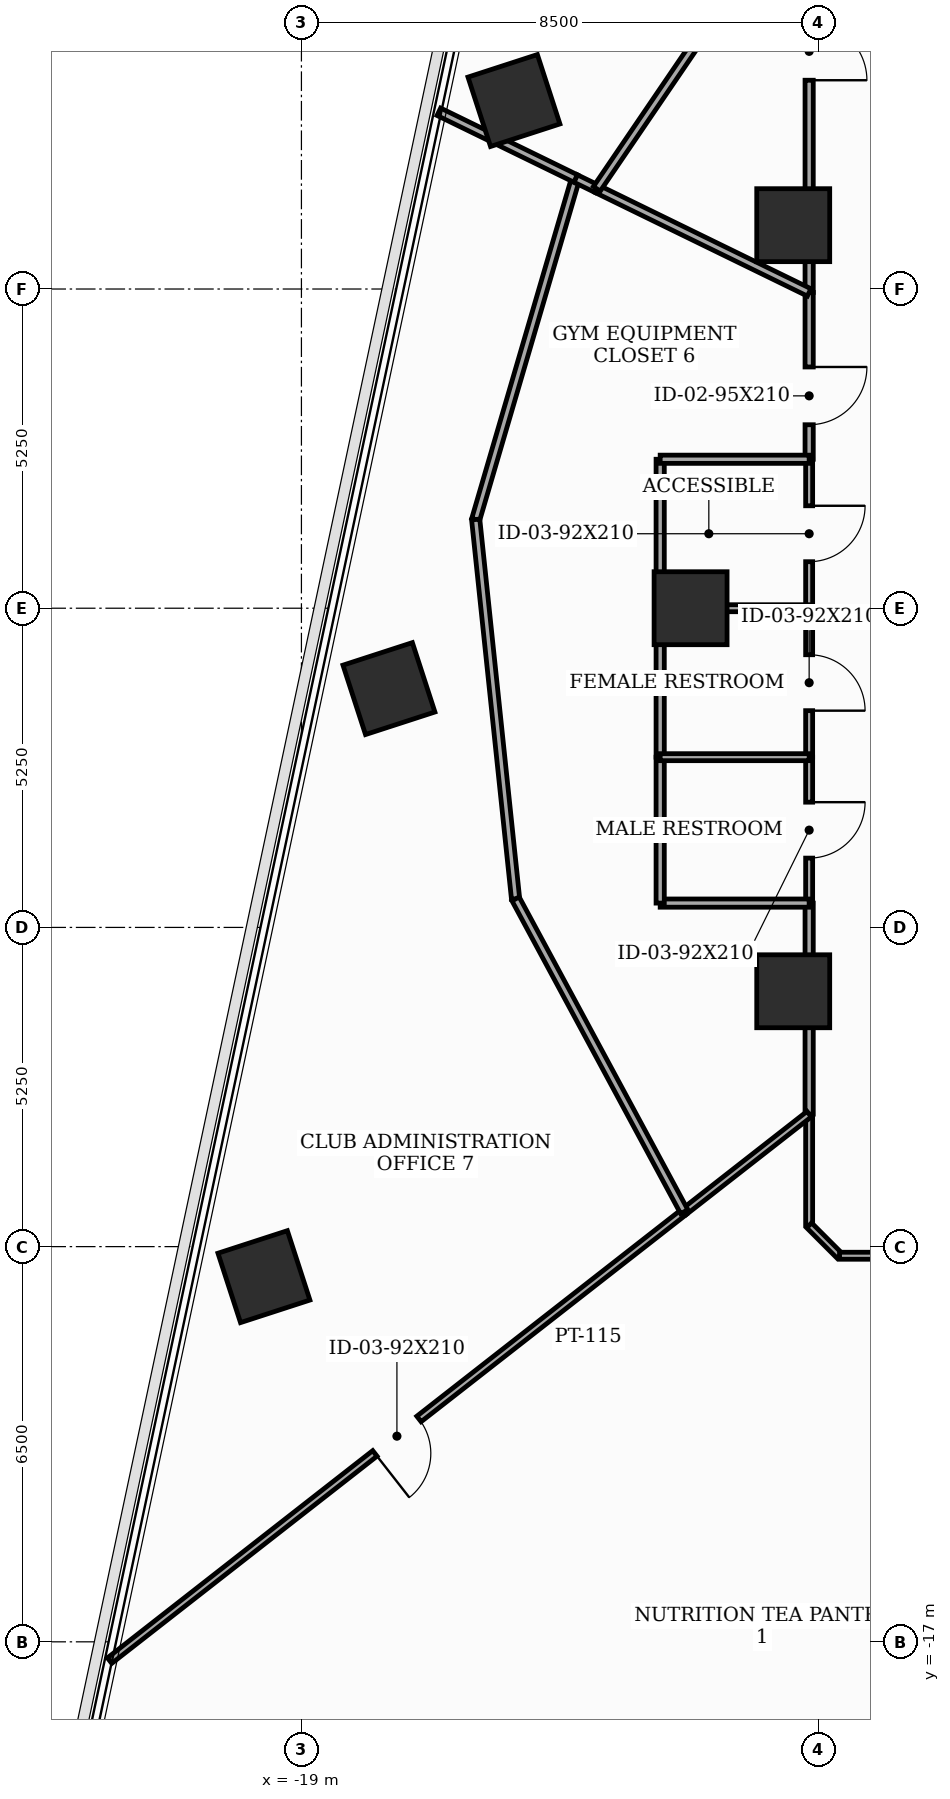
"""IFC4 building model, lengths in metres.
Left out: names, types, materials, properties, quantities, classifications, styles, units other than length and angle.
Written with IfcOpenShell. Run it as: python <this file> out.ifc"""

import sys

from ifc_helpers import new_model, si_unit, direction, frame, frame_2d, origin, origin_2d, place, context, subcontext, project, spatial, rectangle, extrude, element, fill, save


model = new_model("IFC4")
c1 = context("Model", 3, precision=1e-05, world=origin(), true_north=direction((0.0, 1.0)))
c2 = subcontext(c1, "Body", "Model", "MODEL_VIEW")
j1 = project(units=[si_unit("LENGTHUNIT", "METRE"), si_unit("PLANEANGLEUNIT", "RADIAN")], contexts=[c1])
p1 = place(None, origin())
s1 = spatial("IfcSite", under=j1, at=p1, CompositionType="ELEMENT")
p2 = place(p1, origin())
s2 = spatial("IfcBuilding", under=s1, at=p2, CompositionType="ELEMENT")
p3 = place(p2, frame((0.0, 0.0, 108.8)))
s3 = spatial("IfcBuildingStorey", under=s2, at=p3, CompositionType="ELEMENT", Elevation=108.8)
for number, where, z_axis, x_axis in (
    (1, (-10.912, 6.3, 0.0), (0.0, 0.0, 1.0), (1.0, 0.0, 0.0)),
    (2, (-12.6, 0.0, 0.0), (0.0, 0.0, 1.0), (1.0, 0.0, 0.0)),
    (3, (-10.912, -6.3, 0.0), (0.0, 0.0, 1.0), (1.0, 0.0, 0.0)),
    (4, (-15.505, 8.35, 0.0), (0.0, 0.0, 1.0), (0.951, 0.309, 0.0)),
    (5, (-17.561, -1.322, 0.0), (0.0, 0.0, 1.0), (0.951, 0.309, 0.0)),
    (6, (-19.616, -10.994, 0.0), (0.0, 0.0, 1.0), (0.951, 0.309, 0.0)),
):
    element("IfcColumn", number, at=place(p3, frame(where, z_axis=z_axis, x_axis=x_axis)), inside=s3, PredefinedType="COLUMN", context=c2, shape_type="SweptSolid", body=[
        extrude(rectangle(XDim=1.2, YDim=1.2, at=origin_2d()), origin(), (0.0, 0.0, 1.0), 3.7),
    ])
p4 = place(p3, frame((-10.65, -8.321, 0.0), z_axis=(0.0, 0.0, 1.0), x_axis=(0.0, -1.0, 0.0)))
e7 = element("IfcWall", 7, at=p4, inside=s3, PredefinedType="PARTITIONING", context=c2, shape_type="SweptSolid", body=[
    extrude(rectangle(XDim=1.829, YDim=0.115, at=frame_2d((0.915, 0.0))), origin(), (0.0, 0.0, 1.0), 3.5),
])
p5 = place(p3, frame((-10.65, -10.15, 0.0), z_axis=(0.0, 0.0, 1.0), x_axis=(0.707106781187, -0.707106781187, 0.0)))
e8 = element("IfcWall", 8, at=p5, inside=s3, PredefinedType="PARTITIONING", context=c2, shape_type="SweptSolid", body=[
    extrude(rectangle(XDim=0.707, YDim=0.115, at=frame_2d((0.354, 0.0))), origin(), (0.0, 0.0, 1.0), 3.5),
])
p6 = place(p3, frame((-10.15, -10.65, 0.0), z_axis=(0.0, 0.0, 1.0), x_axis=(1.0, 0.0, 0.0)))
e9 = element("IfcWall", 9, at=p6, inside=s3, PredefinedType="PARTITIONING", context=c2, shape_type="SweptSolid", body=[
    extrude(rectangle(XDim=6.158, YDim=0.115, at=frame_2d((3.079, 0.0))), origin(), (0.0, 0.0, 1.0), 2.785),
])
p7 = place(p3, frame((-10.65, -4.85, 0.0), z_axis=(0.0, 0.0, 1.0), x_axis=(0.0, -1.0, 0.0)))
e10 = element("IfcWall", 10, at=p7, inside=s3, PredefinedType="PARTITIONING", context=c2, shape_type="SweptSolid", body=[
    extrude(rectangle(XDim=3.471, YDim=0.135, at=frame_2d((1.735, 0.0))), origin(), (0.0, 0.0, 1.0), 2.785),
])
p8 = place(p3, frame((-10.65, 5.194, 0.0), z_axis=(0.0, 0.0, 1.0), x_axis=(0.0, -1.0, 0.0)))
e11 = element("IfcWall", 11, at=p8, inside=s3, PredefinedType="PARTITIONING", context=c2, shape_type="SweptSolid", body=[
    extrude(rectangle(XDim=2.744, YDim=0.135, at=frame_2d((1.372, 0.0))), origin(), (0.0, 0.0, 1.0), 3.5),
])
p9 = place(p8, frame((1.226, 0.0, 0.0)))
e12 = element("IfcOpeningElement", 12, at=p9, cuts=e11, PredefinedType="OPENING", context=c2, shape_type="SweptSolid", body=[
    extrude(rectangle(XDim=0.95, YDim=2.1, at=frame_2d((0.475, 1.05))), frame((0.0, 0.077, 0.0), z_axis=(0.0, -1.0, 0.0), x_axis=(1.0, 0.0, 0.0)), (0.0, 0.0, 1.0), 0.155),
])
p10 = place(p3, frame((-10.65, 0.0, 0.0), z_axis=(0.0, 0.0, 1.0), x_axis=(0.0, -1.0, 0.0)))
e13 = element("IfcWall", 13, at=p10, inside=s3, PredefinedType="PARTITIONING", context=c2, shape_type="SweptSolid", body=[
    extrude(rectangle(XDim=2.45, YDim=0.115, at=frame_2d((1.225, 0.0))), origin(), (0.0, 0.0, 1.0), 2.785),
])
p11 = place(p10, frame((0.765, 0.0, 0.0)))
e14 = element("IfcOpeningElement", 14, at=p11, cuts=e13, PredefinedType="OPENING", context=c2, shape_type="SweptSolid", body=[
    extrude(rectangle(XDim=0.92, YDim=2.1, at=frame_2d((0.46, 1.05))), frame((0.0, 0.067, 0.0), z_axis=(0.0, -1.0, 0.0), x_axis=(1.0, 0.0, 0.0)), (0.0, 0.0, 1.0), 0.135),
])
p12 = place(p3, frame((-10.65, -2.45, 0.0), z_axis=(0.0, 0.0, 1.0), x_axis=(0.0, -1.0, 0.0)))
e15 = element("IfcWall", 15, at=p12, inside=s3, PredefinedType="PARTITIONING", context=c2, shape_type="SweptSolid", body=[
    extrude(rectangle(XDim=2.4, YDim=0.115, at=frame_2d((1.2, 0.0))), origin(), (0.0, 0.0, 1.0), 3.5),
])
p13 = place(p12, frame((0.74, 0.0, 0.0)))
e16 = element("IfcOpeningElement", 16, at=p13, cuts=e15, PredefinedType="OPENING", context=c2, shape_type="SweptSolid", body=[
    extrude(rectangle(XDim=0.92, YDim=2.1, at=frame_2d((0.46, 1.05))), frame((0.0, 0.067, 0.0), z_axis=(0.0, -1.0, 0.0), x_axis=(1.0, 0.0, 0.0)), (0.0, 0.0, 1.0), 0.135),
])
p14 = place(p3, frame((-10.65, 10.15, 0.0), z_axis=(0.0, 0.0, 1.0), x_axis=(0.0, -1.0, 0.0)))
e17 = element("IfcWall", 17, at=p14, inside=s3, PredefinedType="PARTITIONING", context=c2, shape_type="SweptSolid", body=[
    extrude(rectangle(XDim=4.956, YDim=0.135, at=frame_2d((2.478, 0.0))), origin(), (0.0, 0.0, 1.0), 2.785),
])
p15 = place(p14, frame((0.516, 0.0, 0.0)))
e18 = element("IfcOpeningElement", 18, at=p15, cuts=e17, PredefinedType="OPENING", context=c2, shape_type="SweptSolid", body=[
    extrude(rectangle(XDim=0.95, YDim=2.1, at=frame_2d((0.475, 1.05))), frame((0.0, 0.077, 0.0), z_axis=(0.0, -1.0, 0.0), x_axis=(1.0, 0.0, 0.0)), (0.0, 0.0, 1.0), 0.155),
])
p16 = place(p3, frame((-10.65, 2.45, 0.0), z_axis=(0.0, 0.0, 1.0), x_axis=(0.0, -1.0, 0.0)))
e19 = element("IfcWall", 19, at=p16, inside=s3, PredefinedType="PARTITIONING", context=c2, shape_type="SweptSolid", body=[
    extrude(rectangle(XDim=2.45, YDim=0.115, at=frame_2d((1.225, 0.0))), origin(), (0.0, 0.0, 1.0), 2.785),
])
p17 = place(p16, frame((0.765, 0.0, 0.0)))
e20 = element("IfcOpeningElement", 20, at=p17, cuts=e19, PredefinedType="OPENING", context=c2, shape_type="SweptSolid", body=[
    extrude(rectangle(XDim=0.92, YDim=2.1, at=frame_2d((0.46, 1.05))), frame((0.0, 0.067, 0.0), z_axis=(0.0, -1.0, 0.0), x_axis=(1.0, 0.0, 0.0)), (0.0, 0.0, 1.0), 0.135),
])
p18 = place(p3, frame((-10.65, -8.321, 0.0), z_axis=(0.0, 0.0, 1.0), x_axis=(-0.787998815749, -0.615676754782, 0.0)))
e21 = element("IfcWall", 21, at=p18, inside=s3, PredefinedType="PARTITIONING", context=c2, shape_type="SweptSolid", body=[
    extrude(rectangle(XDim=2.607, YDim=0.115, at=frame_2d((1.303, 0.0))), origin(), (0.0, 0.0, 1.0), 3.5),
])
p19 = place(p3, frame((-12.704, -9.926, 0.0), z_axis=(0.0, 0.0, 1.0), x_axis=(-0.788033940978, -0.615631795692, 0.0)))
e22 = element("IfcWall", 22, at=p19, inside=s3, PredefinedType="PARTITIONING", context=c2, shape_type="SweptSolid", body=[
    extrude(rectangle(XDim=11.993, YDim=0.115, at=frame_2d((5.997, 0.0))), origin(), (0.0, 0.0, 1.0), 2.935),
])
p20 = place(p19, frame((5.537, 0.0, 0.0)))
e23 = element("IfcOpeningElement", 23, at=p20, cuts=e22, PredefinedType="OPENING", context=c2, shape_type="SweptSolid", body=[
    extrude(rectangle(XDim=0.92, YDim=2.1, at=frame_2d((0.46, 1.05))), frame((0.0, 0.067, 0.0), z_axis=(0.0, -1.0, 0.0), x_axis=(1.0, 0.0, 0.0)), (0.0, 0.0, 1.0), 0.135),
])
p21 = place(p3, frame((-13.1, -2.45, 0.0), z_axis=(0.0, 0.0, 1.0), x_axis=(0.0, 1.0, 0.0)))
e24 = element("IfcWall", 24, at=p21, inside=s3, PredefinedType="PARTITIONING", context=c2, shape_type="SweptSolid", body=[
    extrude(rectangle(XDim=2.45, YDim=0.135, at=frame_2d((1.225, 0.0))), origin(), (0.0, 0.0, 1.0), 2.775),
])
p22 = place(p3, frame((-10.65, -4.85, 0.0), z_axis=(0.0, 0.0, 1.0), x_axis=(-1.0, 0.0, 0.0)))
e25 = element("IfcWall", 25, at=p22, inside=s3, PredefinedType="PARTITIONING", context=c2, shape_type="SweptSolid", body=[
    extrude(rectangle(XDim=2.45, YDim=0.135, at=frame_2d((1.225, 0.0))), origin(), (0.0, 0.0, 1.0), 2.785),
])
p23 = place(p3, frame((-13.1, -4.85, 0.0), z_axis=(0.0, 0.0, 1.0), x_axis=(0.0, 1.0, 0.0)))
e26 = element("IfcWall", 26, at=p23, inside=s3, PredefinedType="PARTITIONING", context=c2, shape_type="SweptSolid", body=[
    extrude(rectangle(XDim=2.4, YDim=0.135, at=frame_2d((1.2, 0.0))), origin(), (0.0, 0.0, 1.0), 3.5),
])
p24 = place(p3, frame((-14.491, 7.068, 0.0), z_axis=(0.0, 0.0, 1.0), x_axis=(-0.28111457881, -0.95967421221, 0.0)))
e27 = element("IfcWall", 27, at=p24, inside=s3, PredefinedType="PARTITIONING", context=c2, shape_type="SweptSolid", body=[
    extrude(rectangle(XDim=5.845, YDim=0.135, at=frame_2d((2.922, 0.0))), origin(), (0.0, 0.0, 1.0), 3.49),
])
p25 = place(p3, frame((-16.134, 1.459, 0.0), z_axis=(0.0, 0.0, 1.0), x_axis=(0.104553126753, -0.994519302822, 0.0)))
e28 = element("IfcWall", 28, at=p25, inside=s3, PredefinedType="PARTITIONING", context=c2, shape_type="SweptSolid", body=[
    extrude(rectangle(XDim=6.274, YDim=0.135, at=frame_2d((3.137, 0.0))), origin(), (0.0, 0.0, 1.0), 2.775),
])
p26 = place(p3, frame((-15.478, -4.781, 0.0), z_axis=(0.0, 0.0, 1.0), x_axis=(0.47456801742, -0.880218834633, 0.0)))
e29 = element("IfcWall", 29, at=p26, inside=s3, PredefinedType="PARTITIONING", context=c2, shape_type="SweptSolid", body=[
    extrude(rectangle(XDim=5.845, YDim=0.135, at=frame_2d((2.923, 0.0))), origin(), (0.0, 0.0, 1.0), 2.785),
])
p27 = place(p3, frame((-14.142, 6.898, 0.0), z_axis=(0.0, 0.0, 1.0), x_axis=(-0.898786579289, 0.438386456098, 0.0)))
e30 = element("IfcWall", 30, at=p27, inside=s3, PredefinedType="PARTITIONING", context=c2, shape_type="SweptSolid", body=[
    extrude(rectangle(XDim=0.388, YDim=0.135, at=frame_2d((0.194, 0.0))), origin(), (0.0, 0.0, 1.0), 3.5),
])
p28 = place(p3, frame((-10.65, 5.194, 0.0), z_axis=(0.0, 0.0, 1.0), x_axis=(-0.898732815367, 0.438496666558, 0.0)))
e31 = element("IfcWall", 31, at=p28, inside=s3, PredefinedType="PARTITIONING", context=c2, shape_type="SweptSolid", body=[
    extrude(rectangle(XDim=3.886, YDim=0.135, at=frame_2d((1.943, 0.0))), origin(), (0.0, 0.0, 1.0), 2.785),
])
p29 = place(p3, frame((-13.1, 0.0, 0.0), z_axis=(0.0, 0.0, 1.0), x_axis=(0.0, 1.0, 0.0)))
e32 = element("IfcWall", 32, at=p29, inside=s3, PredefinedType="PARTITIONING", context=c2, shape_type="SweptSolid", body=[
    extrude(rectangle(XDim=2.45, YDim=0.135, at=frame_2d((1.225, 0.0))), origin(), (0.0, 0.0, 1.0), 2.775),
])
p30 = place(p3, frame((-13.1, 2.45, 0.0), z_axis=(0.0, 0.0, 1.0), x_axis=(1.0, 0.0, 0.0)))
e33 = element("IfcWall", 33, at=p30, inside=s3, PredefinedType="PARTITIONING", context=c2, shape_type="SweptSolid", body=[
    extrude(rectangle(XDim=2.45, YDim=0.135, at=frame_2d((1.225, 0.0))), origin(), (0.0, 0.0, 1.0), 2.785),
])
p31 = place(p3, frame((-13.1, -2.45, 0.0), z_axis=(0.0, 0.0, 1.0), x_axis=(1.0, 0.0, 0.0)))
e34 = element("IfcWall", 34, at=p31, inside=s3, PredefinedType="PARTITIONING", context=c2, shape_type="SweptSolid", body=[
    extrude(rectangle(XDim=2.45, YDim=0.115, at=frame_2d((1.225, 0.0))), origin(), (0.0, 0.0, 1.0), 2.785),
])
p32 = place(p3, frame((-10.65, 0.0, 0.0), z_axis=(0.0, 0.0, 1.0), x_axis=(-1.0, 0.0, 0.0)))
e35 = element("IfcWall", 35, at=p32, inside=s3, PredefinedType="PARTITIONING", context=c2, shape_type="SweptSolid", body=[
    extrude(rectangle(XDim=2.45, YDim=0.115, at=frame_2d((1.225, 0.0))), origin(), (0.0, 0.0, 1.0), 2.775),
])
p33 = place(p3, frame((-14.491, 7.068, 0.0), z_axis=(0.0, 0.0, 1.0), x_axis=(-0.898774071038, 0.438412099777, 0.0)))
e36 = element("IfcWall", 36, at=p33, inside=s3, PredefinedType="PARTITIONING", context=c2, shape_type="SweptSolid", body=[
    extrude(rectangle(XDim=2.503, YDim=0.135, at=frame_2d((1.251, 0.0))), origin(), (0.0, 0.0, 1.0), 2.925),
])
p34 = place(p3, frame((-14.142, 6.898, 0.0), z_axis=(0.0, 0.0, 1.0), x_axis=(0.562725506953, 0.826643819202, 0.0)))
e37 = element("IfcWall", 37, at=p34, inside=s3, PredefinedType="PARTITIONING", context=c2, shape_type="SweptSolid", body=[
    extrude(rectangle(XDim=4.933, YDim=0.135, at=frame_2d((2.467, 0.0))), origin(), (0.0, 0.0, 1.0), 2.785),
])
p35 = place(p9, origin())
e38 = element("IfcDoor", 38, at=p35, inside=s3, OperationType="SINGLE_SWING_LEFT", PredefinedType="DOOR", context=c2, shape_type="SweptSolid", body=[
    extrude(rectangle(XDim=0.95, YDim=2.1, at=frame_2d((0.475, 1.05))), frame((0.0, 0.025, 0.0), z_axis=(0.0, -1.0, 0.0), x_axis=(1.0, 0.0, 0.0)), (0.0, 0.0, 1.0), 0.05),
])
fill(e12, e38)
p36 = place(p11, origin())
e39 = element("IfcDoor", 39, at=p36, inside=s3, OperationType="SINGLE_SWING_RIGHT", PredefinedType="DOOR", context=c2, shape_type="SweptSolid", body=[
    extrude(rectangle(XDim=0.92, YDim=2.1, at=frame_2d((0.46, 1.05))), frame((0.0, 0.025, 0.0), z_axis=(0.0, -1.0, 0.0), x_axis=(1.0, 0.0, 0.0)), (0.0, 0.0, 1.0), 0.05),
])
fill(e14, e39)
p37 = place(p13, origin())
e40 = element("IfcDoor", 40, at=p37, inside=s3, OperationType="SINGLE_SWING_LEFT", PredefinedType="DOOR", context=c2, shape_type="SweptSolid", body=[
    extrude(rectangle(XDim=0.92, YDim=2.1, at=frame_2d((0.46, 1.05))), frame((0.0, 0.025, 0.0), z_axis=(0.0, -1.0, 0.0), x_axis=(1.0, 0.0, 0.0)), (0.0, 0.0, 1.0), 0.05),
])
fill(e16, e40)
p38 = place(p15, origin())
e41 = element("IfcDoor", 41, at=p38, inside=s3, OperationType="SINGLE_SWING_RIGHT", PredefinedType="DOOR", context=c2, shape_type="SweptSolid", body=[
    extrude(rectangle(XDim=0.95, YDim=2.1, at=frame_2d((0.475, 1.05))), frame((0.0, 0.025, 0.0), z_axis=(0.0, -1.0, 0.0), x_axis=(1.0, 0.0, 0.0)), (0.0, 0.0, 1.0), 0.05),
])
fill(e18, e41)
p39 = place(p17, origin())
e42 = element("IfcDoor", 42, at=p39, inside=s3, OperationType="SINGLE_SWING_LEFT", PredefinedType="DOOR", context=c2, shape_type="SweptSolid", body=[
    extrude(rectangle(XDim=0.92, YDim=2.1, at=frame_2d((0.46, 1.05))), frame((0.0, 0.025, 0.0), z_axis=(0.0, -1.0, 0.0), x_axis=(1.0, 0.0, 0.0)), (0.0, 0.0, 1.0), 0.05),
])
fill(e20, e42)
p40 = place(p20, origin())
e43 = element("IfcDoor", 43, at=p40, inside=s3, OperationType="SINGLE_SWING_RIGHT", PredefinedType="DOOR", context=c2, shape_type="SweptSolid", body=[
    extrude(rectangle(XDim=0.92, YDim=2.1, at=frame_2d((0.46, 1.05))), frame((0.0, 0.025, 0.0), z_axis=(0.0, -1.0, 0.0), x_axis=(1.0, 0.0, 0.0)), (0.0, 0.0, 1.0), 0.05),
])
fill(e23, e43)
save(model, sys.argv[1])
